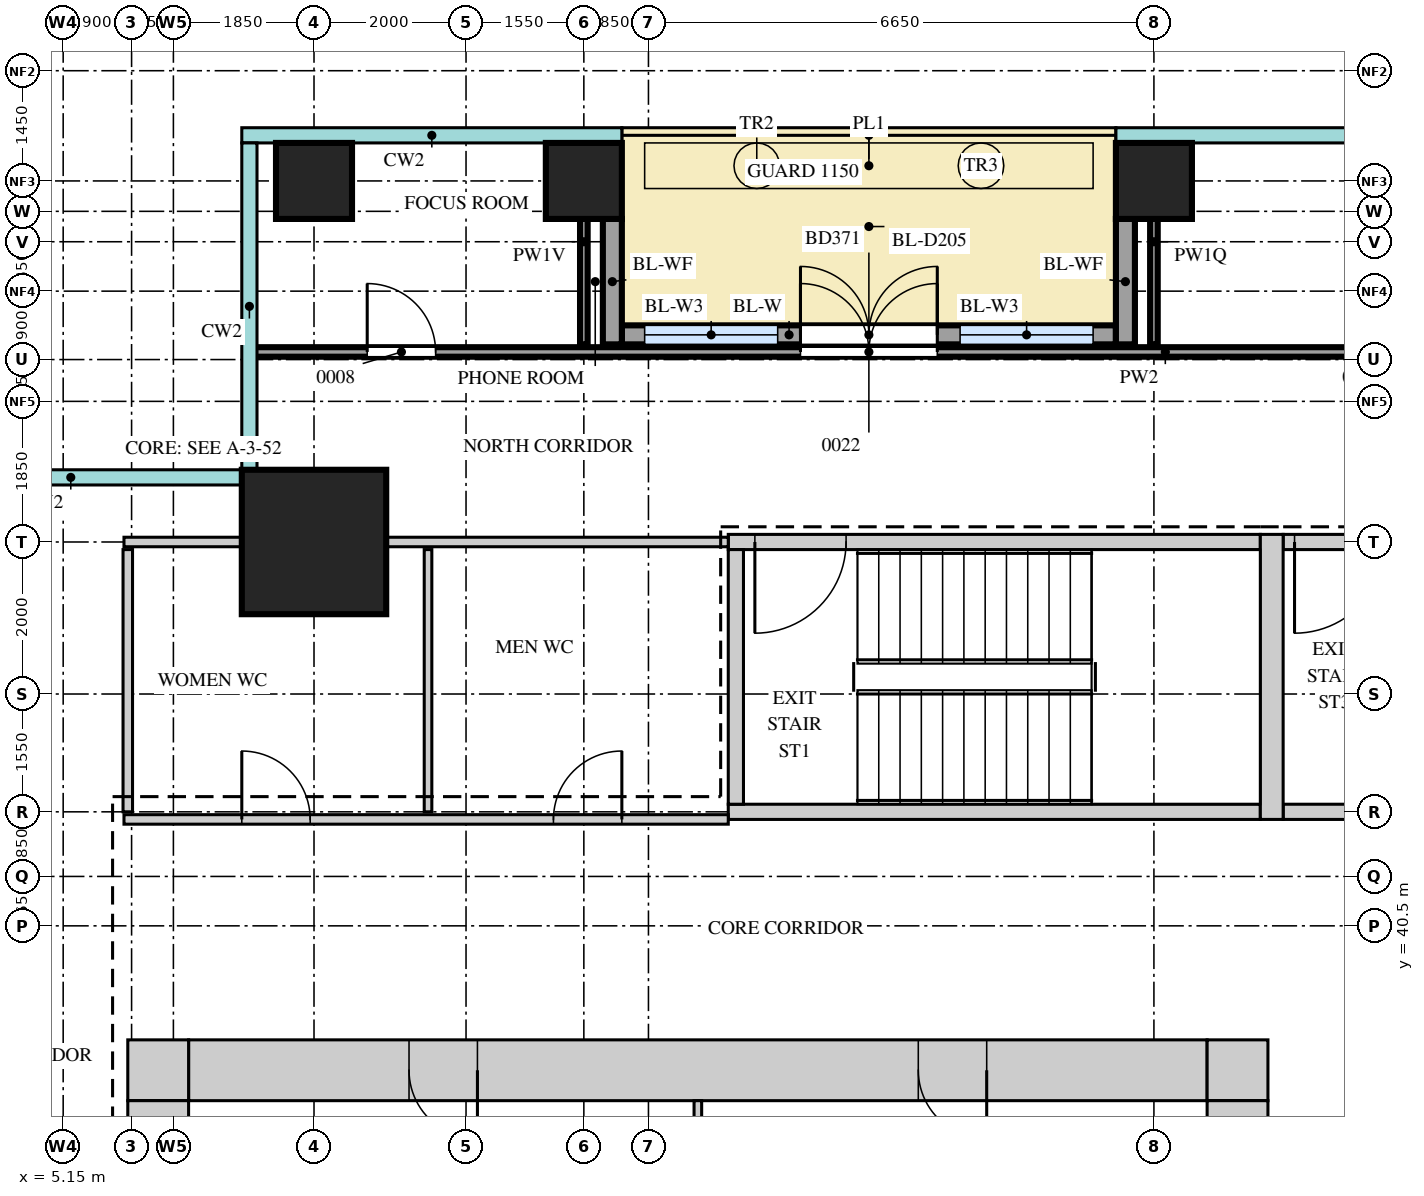
"""IFC4 building model, lengths in metres.
Left out: names, types, materials, properties, quantities, classifications, styles, units other than length and angle.
Written with IfcOpenShell. Run it as: python <this file> out.ifc"""

import sys

from ifc_helpers import new_model, si_unit, direction, frame, frame_2d, origin, origin_2d, place, context, subcontext, project, spatial, rectangle, extrude, source, transform, mapped, element, fill, save


model = new_model("IFC4")
c1 = context("Model", 3, precision=1e-05, world=origin(), true_north=direction((0.0, 1.0)))
c2 = subcontext(c1, "Body", "Model", "MODEL_VIEW")
j1 = project(units=[si_unit("LENGTHUNIT", "METRE"), si_unit("PLANEANGLEUNIT", "RADIAN")], contexts=[c1])
p1 = place(None, origin())
s1 = spatial("IfcSite", under=j1, at=p1, CompositionType="ELEMENT")
p2 = place(p1, origin())
s2 = spatial("IfcBuilding", under=s1, at=p2, CompositionType="ELEMENT")
p3 = place(p2, frame((0.0, 0.0, 172.7)))
s3 = spatial("IfcBuildingStorey", under=s2, at=p3, CompositionType="ELEMENT", Elevation=172.7)
m1 = source(origin(), c2, "Body", "SweptSolid", [
    extrude(rectangle(XDim=13.4, YDim=0.8, at=frame_2d((6.7, 0.0))), origin(), (0.0, 0.0, 1.0), 3.75),
])
p4 = place(p3, frame((6.8, 38.6, 0.0), z_axis=(0.0, 0.0, 1.0), x_axis=(1.0, 0.0, 0.0)))
e1 = element("IfcWall", 1, at=p4, inside=s3, PredefinedType="SHEAR", context=c2, shape_type="MappedRepresentation", body=[
    mapped(m1, transform((0.0, 0.0, 0.0))),
])
m2 = source(origin(), c2, "Body", "SweptSolid", [
    extrude(rectangle(XDim=0.9, YDim=2.1, at=frame_2d((0.45, 1.05))), frame((0.0, 0.41, 0.0), z_axis=(0.0, -1.0, 0.0), x_axis=(1.0, 0.0, 0.0)), (0.0, 0.0, 1.0), 0.82),
])
p5 = place(p4, frame((2.9, 0.0, 0.0)))
e2 = element("IfcOpeningElement", 2, at=p5, cuts=e1, PredefinedType="OPENING", context=c2, shape_type="MappedRepresentation", body=[
    mapped(m2, transform((0.0, 0.0, 0.0))),
])
p6 = place(p4, frame((9.6, 0.0, 0.0)))
e3 = element("IfcOpeningElement", 3, at=p6, cuts=e1, PredefinedType="OPENING", context=c2, shape_type="MappedRepresentation", body=[
    mapped(m2, transform((0.0, 0.0, 0.0))),
])
m3 = source(origin(), c2, "Body", "SweptSolid", [
    extrude(rectangle(XDim=0.8, YDim=0.8, at=frame_2d((0.4, 0.0))), origin(), (0.0, 0.0, 1.0), 3.75),
])
for number, where, z_axis, x_axis in (
    (4, (20.2, 38.6, 0.0), (0.0, 0.0, 1.0), (1.0, 0.0, 0.0)),
    (5, (6.0, 38.6, 0.0), (0.0, 0.0, 1.0), (1.0, 0.0, 0.0)),
):
    element("IfcWall", number, at=place(p3, frame(where, z_axis=z_axis, x_axis=x_axis)), inside=s3, PredefinedType="SHEAR", context=c2, shape_type="MappedRepresentation", body=[
        mapped(m3, transform((0.0, 0.0, 0.0))),
    ])
m4 = source(origin(), c2, "Body", "SweptSolid", [
    extrude(rectangle(XDim=22.4, YDim=0.8, at=frame_2d((11.2, 0.0))), origin(), (0.0, 0.0, 1.0), 3.75),
])
p7 = place(p3, frame((20.6, 15.8, 0.0), z_axis=(0.0, 0.0, 1.0), x_axis=(0.0, 1.0, 0.0)))
e6 = element("IfcWall", 6, at=p7, inside=s3, PredefinedType="SHEAR", context=c2, shape_type="MappedRepresentation", body=[
    mapped(m4, transform((0.0, 0.0, 0.0))),
])
m5 = source(origin(), c2, "Body", "SweptSolid", [
    extrude(rectangle(XDim=1.8, YDim=2.1, at=frame_2d((0.9, 1.05))), frame((0.0, 0.41, 0.0), z_axis=(0.0, -1.0, 0.0), x_axis=(1.0, 0.0, 0.0)), (0.0, 0.0, 1.0), 0.82),
])
p8 = place(p7, frame((10.7, 0.0, 0.0)))
e7 = element("IfcOpeningElement", 7, at=p8, cuts=e6, PredefinedType="OPENING", context=c2, shape_type="MappedRepresentation", body=[
    mapped(m5, transform((0.0, 0.0, 0.0))),
])
p9 = place(p7, frame((0.35, 0.0, 0.0)))
e8 = element("IfcOpeningElement", 8, at=p9, cuts=e6, PredefinedType="OPENING", context=c2, shape_type="MappedRepresentation", body=[
    mapped(m2, transform((0.0, 0.0, 0.0))),
])
p10 = place(p7, frame((2.8, 0.0, 0.0)))
e9 = element("IfcOpeningElement", 9, at=p10, cuts=e6, PredefinedType="OPENING", context=c2, shape_type="MappedRepresentation", body=[
    mapped(m2, transform((0.0, 0.0, 0.0))),
])
p11 = place(p7, frame((5.55, 0.0, 0.0)))
e10 = element("IfcOpeningElement", 10, at=p11, cuts=e6, PredefinedType="OPENING", context=c2, shape_type="MappedRepresentation", body=[
    mapped(m2, transform((0.0, 0.0, 0.0))),
])
p12 = place(p3, frame((6.4, 15.8, 0.0), z_axis=(0.0, 0.0, 1.0), x_axis=(0.0, 1.0, 0.0)))
e11 = element("IfcWall", 11, at=p12, inside=s3, PredefinedType="SHEAR", context=c2, shape_type="MappedRepresentation", body=[
    mapped(m4, transform((0.0, 0.0, 0.0))),
])
m6 = source(origin(), c2, "Body", "SweptSolid", [
    extrude(rectangle(XDim=7.0, YDim=0.2, at=frame_2d((3.5, 0.0))), origin(), (0.0, 0.0, 1.0), 3.75),
])
p13 = place(p3, frame((13.9, 45.55, 0.0), z_axis=(0.0, 0.0, 1.0), x_axis=(1.0, 0.0, 0.0)))
e12 = element("IfcWall", 12, at=p13, inside=s3, PredefinedType="SHEAR", context=c2, shape_type="MappedRepresentation", body=[
    mapped(m6, transform((0.0, 0.0, 0.0))),
])
m7 = source(origin(), c2, "Body", "SweptSolid", [
    extrude(rectangle(XDim=1.2, YDim=2.1, at=frame_2d((0.6, 1.05))), frame((0.0, 0.11, 0.0), z_axis=(0.0, -1.0, 0.0), x_axis=(1.0, 0.0, 0.0)), (0.0, 0.0, 1.0), 0.22),
])
p14 = place(p13, frame((0.35, 0.0, 0.0)))
e13 = element("IfcOpeningElement", 13, at=p14, cuts=e12, PredefinedType="OPENING", context=c2, shape_type="MappedRepresentation", body=[
    mapped(m7, transform((0.0, 0.0, 0.0))),
])
p15 = place(p3, frame((13.9, 42.0, 0.0), z_axis=(0.0, 0.0, 1.0), x_axis=(1.0, 0.0, 0.0)))
e14 = element("IfcWall", 14, at=p15, inside=s3, PredefinedType="SHEAR", context=c2, shape_type="MappedRepresentation", body=[
    mapped(m6, transform((0.0, 0.0, 0.0))),
])
m8 = source(origin(), c2, "Body", "SweptSolid", [
    extrude(rectangle(XDim=7.1, YDim=0.2, at=frame_2d((3.55, 0.0))), origin(), (0.0, 0.0, 1.0), 3.75),
])
p16 = place(p3, frame((21.2, 45.55, 0.0), z_axis=(0.0, 0.0, 1.0), x_axis=(1.0, 0.0, 0.0)))
e15 = element("IfcWall", 15, at=p16, inside=s3, PredefinedType="SHEAR", context=c2, shape_type="MappedRepresentation", body=[
    mapped(m8, transform((0.0, 0.0, 0.0))),
])
p17 = place(p16, frame((0.15, 0.0, 0.0)))
e16 = element("IfcOpeningElement", 16, at=p17, cuts=e15, PredefinedType="OPENING", context=c2, shape_type="MappedRepresentation", body=[
    mapped(m7, transform((0.0, 0.0, 0.0))),
])
p18 = place(p3, frame((21.2, 42.0, 0.0), z_axis=(0.0, 0.0, 1.0), x_axis=(1.0, 0.0, 0.0)))
e17 = element("IfcWall", 17, at=p18, inside=s3, PredefinedType="SHEAR", context=c2, shape_type="MappedRepresentation", body=[
    mapped(m8, transform((0.0, 0.0, 0.0))),
])
m9 = source(origin(), c2, "Body", "SweptSolid", [
    extrude(rectangle(XDim=3.75, YDim=0.3, at=frame_2d((1.875, 0.0))), origin(), (0.0, 0.0, 1.0), 3.75),
])
p19 = place(p3, frame((21.05, 41.9, 0.0), z_axis=(0.0, 0.0, 1.0), x_axis=(0.0, 1.0, 0.0)))
e18 = element("IfcWall", 18, at=p19, inside=s3, PredefinedType="SHEAR", context=c2, shape_type="MappedRepresentation", body=[
    mapped(m9, transform((0.0, 0.0, 0.0))),
])
m10 = source(origin(), c2, "Body", "SweptSolid", [
    extrude(rectangle(XDim=3.35, YDim=0.2, at=frame_2d((1.675, 0.0))), origin(), (0.0, 0.0, 1.0), 3.75),
])
p20 = place(p3, frame((14.0, 42.1, 0.0), z_axis=(0.0, 0.0, 1.0), x_axis=(0.0, 1.0, 0.0)))
e19 = element("IfcWall", 19, at=p20, inside=s3, PredefinedType="SHEAR", context=c2, shape_type="MappedRepresentation", body=[
    mapped(m10, transform((0.0, 0.0, 0.0))),
])
m11 = source(origin(), c2, "Body", "SweptSolid", [
    extrude(rectangle(XDim=1.9, YDim=1.9, at=origin_2d()), origin(), (0.0, 0.0, 1.0), 4.0),
])
p21 = place(p3, frame((8.45, 45.55, 0.0), z_axis=(0.0, 0.0, 1.0), x_axis=(1.0, 0.0, 0.0)))
e20 = element("IfcColumn", 20, at=p21, inside=s3, PredefinedType="COLUMN", context=c2, shape_type="MappedRepresentation", body=[
    mapped(m11, transform((0.0, 0.0, 0.0))),
])
m12 = source(origin(), c2, "Body", "SweptSolid", [
    extrude(rectangle(XDim=1.0, YDim=1.0, at=origin_2d()), origin(), (0.0, 0.0, 1.0), 3.75),
])
for number, where, z_axis, x_axis in (
    (21, (8.45, 50.3, 0.0), (0.0, 0.0, 1.0), (1.0, 0.0, 0.0)),
    (22, (12.0, 50.3, 0.0), (0.0, 0.0, 1.0), (1.0, 0.0, 0.0)),
    (23, (19.5, 50.3, 0.0), (0.0, 0.0, 1.0), (1.0, 0.0, 0.0)),
):
    element("IfcColumn", number, at=place(p3, frame(where, z_axis=z_axis, x_axis=x_axis)), inside=s3, PredefinedType="COLUMN", context=c2, shape_type="MappedRepresentation", body=[
        mapped(m12, transform((0.0, 0.0, 0.0))),
    ])
m13 = source(origin(), c2, "Body", "SweptSolid", [
    extrude(rectangle(XDim=6.5, YDim=0.25, at=frame_2d((3.25, 0.0))), origin(), (0.0, 0.0, 1.0), 3.75),
])
p22 = place(p3, frame((12.5, 48.275, 0.0), z_axis=(0.0, 0.0, 1.0), x_axis=(1.0, 0.0, 0.0)))
e24 = element("IfcWall", 24, at=p22, inside=s3, PredefinedType="SOLIDWALL", context=c2, shape_type="MappedRepresentation", body=[
    mapped(m13, transform((0.0, 0.0, 0.0))),
])
m14 = source(origin(), c2, "Body", "SweptSolid", [
    extrude(rectangle(XDim=1.75, YDim=2.4, at=frame_2d((0.875, 1.2))), frame((0.0, 0.135, 0.0), z_axis=(0.0, -1.0, 0.0), x_axis=(1.0, 0.0, 0.0)), (0.0, 0.0, 1.0), 0.27),
])
p23 = place(p22, frame((0.3, 0.0, 0.0)))
e25 = element("IfcOpeningElement", 25, at=p23, cuts=e24, PredefinedType="OPENING", context=c2, shape_type="MappedRepresentation", body=[
    mapped(m14, transform((0.0, 0.0, 0.0))),
])
p24 = place(p22, frame((4.45, 0.0, 0.0)))
e26 = element("IfcOpeningElement", 26, at=p24, cuts=e24, PredefinedType="OPENING", context=c2, shape_type="MappedRepresentation", body=[
    mapped(m14, transform((0.0, 0.0, 0.0))),
])
m15 = source(origin(), c2, "Body", "SweptSolid", [
    extrude(rectangle(XDim=1.8, YDim=2.4, at=frame_2d((0.9, 1.2))), frame((0.0, 0.135, 0.0), z_axis=(0.0, -1.0, 0.0), x_axis=(1.0, 0.0, 0.0)), (0.0, 0.0, 1.0), 0.27),
])
p25 = place(p22, frame((2.35, 0.0, 0.0)))
e27 = element("IfcOpeningElement", 27, at=p25, cuts=e24, PredefinedType="OPENING", context=c2, shape_type="MappedRepresentation", body=[
    mapped(m15, transform((0.0, 0.0, 0.0))),
])
m16 = source(origin(), c2, "Body", "SweptSolid", [
    extrude(rectangle(XDim=1.65, YDim=0.25, at=frame_2d((0.825, 0.0))), origin(), (0.0, 0.0, 1.0), 3.45),
])
for number, where, z_axis, x_axis in (
    (28, (12.375, 49.8, 0.0), (0.0, 0.0, 1.0), (0.0, -1.0, 0.0)),
    (29, (19.125, 49.8, 0.0), (0.0, 0.0, 1.0), (0.0, -1.0, 0.0)),
):
    element("IfcWall", number, at=place(p3, frame(where, z_axis=z_axis, x_axis=x_axis)), inside=s3, PredefinedType="SOLIDWALL", context=c2, shape_type="MappedRepresentation", body=[
        mapped(m16, transform((0.0, 0.0, 0.0))),
    ])
m17 = source(origin(), c2, "Body", "SweptSolid", [
    extrude(rectangle(XDim=6.0, YDim=0.1, at=frame_2d((3.0, 0.0))), origin(), (0.0, 0.0, 1.0), 3.8),
])
p26 = place(p3, frame((13.5, 32.2, 0.0), z_axis=(0.0, 0.0, 1.0), x_axis=(0.0, 1.0, 0.0)))
e30 = element("IfcWall", 30, at=p26, inside=s3, PredefinedType="PARTITIONING", context=c2, shape_type="MappedRepresentation", body=[
    mapped(m17, transform((0.0, 0.0, 0.0))),
])
m18 = source(origin(), c2, "Body", "SweptSolid", [
    extrude(rectangle(XDim=7.95, YDim=0.125, at=frame_2d((3.975, 0.0))), origin(), (0.0, 0.0, 1.0), 3.8),
])
p27 = place(p3, frame((5.95, 41.9, 0.0), z_axis=(0.0, 0.0, 1.0), x_axis=(1.0, 0.0, 0.0)))
e31 = element("IfcWall", 31, at=p27, inside=s3, PredefinedType="PARTITIONING", context=c2, shape_type="MappedRepresentation", body=[
    mapped(m18, transform((0.0, 0.0, 0.0))),
])
m19 = source(origin(), c2, "Body", "SweptSolid", [
    extrude(rectangle(XDim=0.9, YDim=2.1, at=frame_2d((0.45, 1.05))), frame((0.0, 0.073, 0.0), z_axis=(0.0, -1.0, 0.0), x_axis=(1.0, 0.0, 0.0)), (0.0, 0.0, 1.0), 0.145),
])
p28 = place(p27, frame((1.55, 0.0, 0.0)))
e32 = element("IfcOpeningElement", 32, at=p28, cuts=e31, PredefinedType="OPENING", context=c2, shape_type="MappedRepresentation", body=[
    mapped(m19, transform((0.0, 0.0, 0.0))),
])
p29 = place(p27, frame((5.65, 0.0, 0.0)))
e33 = element("IfcOpeningElement", 33, at=p29, cuts=e31, PredefinedType="OPENING", context=c2, shape_type="MappedRepresentation", body=[
    mapped(m19, transform((0.0, 0.0, 0.0))),
])
m20 = source(origin(), c2, "Body", "SweptSolid", [
    extrude(rectangle(XDim=3.45, YDim=0.125, at=frame_2d((1.725, 0.0))), origin(), (0.0, 0.0, 1.0), 3.8),
])
p30 = place(p3, frame((6.0, 42.0, 0.0), z_axis=(0.0, 0.0, 1.0), x_axis=(0.0, 1.0, 0.0)))
e34 = element("IfcWall", 34, at=p30, inside=s3, PredefinedType="PARTITIONING", context=c2, shape_type="MappedRepresentation", body=[
    mapped(m20, transform((0.0, 0.0, 0.0))),
])
m21 = source(origin(), c2, "Body", "SweptSolid", [
    extrude(rectangle(XDim=3.45, YDim=0.1, at=frame_2d((1.725, 0.0))), origin(), (0.0, 0.0, 1.0), 3.8),
])
p31 = place(p3, frame((9.95, 42.0, 0.0), z_axis=(0.0, 0.0, 1.0), x_axis=(0.0, 1.0, 0.0)))
e35 = element("IfcWall", 35, at=p31, inside=s3, PredefinedType="PARTITIONING", context=c2, shape_type="MappedRepresentation", body=[
    mapped(m21, transform((0.0, 0.0, 0.0))),
])
m22 = source(origin(), c2, "Body", "SweptSolid", [
    extrude(rectangle(XDim=7.95, YDim=0.125, at=frame_2d((3.975, 0.0))), origin(), (0.0, 0.0, 1.0), 3.25),
])
p32 = place(p3, frame((5.95, 45.55, 0.0), z_axis=(0.0, 0.0, 1.0), x_axis=(1.0, 0.0, 0.0)))
e36 = element("IfcWall", 36, at=p32, inside=s3, PredefinedType="PARTITIONING", context=c2, shape_type="MappedRepresentation", body=[
    mapped(m22, transform((0.0, 0.0, 0.0))),
])
m23 = source(origin(), c2, "Body", "SweptSolid", [
    extrude(rectangle(XDim=24.35, YDim=0.125, at=frame_2d((12.175, 0.0))), origin(), (0.0, 0.0, 1.0), 3.8),
])
p33 = place(p3, frame((7.65, 48.05, 0.0), z_axis=(0.0, 0.0, 1.0), x_axis=(1.0, 0.0, 0.0)))
e37 = element("IfcWall", 37, at=p33, inside=s3, PredefinedType="PARTITIONING", context=c2, shape_type="MappedRepresentation", body=[
    mapped(m23, transform((0.0, 0.0, 0.0))),
])
p34 = place(p33, frame((1.5, 0.0, 0.0)))
e38 = element("IfcOpeningElement", 38, at=p34, cuts=e37, PredefinedType="OPENING", context=c2, shape_type="MappedRepresentation", body=[
    mapped(m19, transform((0.0, 0.0, 0.0))),
])
m24 = source(origin(), c2, "Body", "SweptSolid", [
    extrude(rectangle(XDim=1.8, YDim=2.1, at=frame_2d((0.9, 1.05))), frame((0.0, 0.073, 0.0), z_axis=(0.0, -1.0, 0.0), x_axis=(1.0, 0.0, 0.0)), (0.0, 0.0, 1.0), 0.145),
])
p35 = place(p33, frame((7.2, 0.0, 0.0)))
e39 = element("IfcOpeningElement", 39, at=p35, cuts=e37, PredefinedType="OPENING", context=c2, shape_type="MappedRepresentation", body=[
    mapped(m24, transform((0.0, 0.0, 0.0))),
])
p36 = place(p33, frame((15.0, 0.0, 0.0)))
e40 = element("IfcOpeningElement", 40, at=p36, cuts=e37, PredefinedType="OPENING", context=c2, shape_type="MappedRepresentation", body=[
    mapped(m19, transform((0.0, 0.0, 0.0))),
])
p37 = place(p33, frame((21.35, 0.0, 0.0)))
e41 = element("IfcOpeningElement", 41, at=p37, cuts=e37, PredefinedType="OPENING", context=c2, shape_type="MappedRepresentation", body=[
    mapped(m19, transform((0.0, 0.0, 0.0))),
])
m25 = source(origin(), c2, "Body", "SweptSolid", [
    extrude(rectangle(XDim=2.7, YDim=0.1, at=frame_2d((1.35, 0.0))), origin(), (0.0, 0.0, 1.0), 3.25),
])
p38 = place(p3, frame((12.0, 48.15, 0.0), z_axis=(0.0, 0.0, 1.0), x_axis=(0.0, 1.0, 0.0)))
e42 = element("IfcWall", 42, at=p38, inside=s3, PredefinedType="PARTITIONING", context=c2, shape_type="MappedRepresentation", body=[
    mapped(m25, transform((0.0, 0.0, 0.0))),
])
m26 = source(origin(), c2, "Body", "SweptSolid", [
    extrude(rectangle(XDim=2.7, YDim=0.1, at=frame_2d((1.35, 0.0))), origin(), (0.0, 0.0, 1.0), 3.42),
])
p39 = place(p3, frame((19.5, 48.15, 0.0), z_axis=(0.0, 0.0, 1.0), x_axis=(0.0, 1.0, 0.0)))
e43 = element("IfcWall", 43, at=p39, inside=s3, PredefinedType="PARTITIONING", context=c2, shape_type="MappedRepresentation", body=[
    mapped(m26, transform((0.0, 0.0, 0.0))),
])
m27 = source(origin(), c2, "Body", "SweptSolid", [
    extrude(rectangle(XDim=1.75, YDim=2.4, at=frame_2d((0.875, 1.2))), frame((0.0, 0.03, 0.0), z_axis=(0.0, -1.0, 0.0), x_axis=(1.0, 0.0, 0.0)), (0.0, 0.0, 1.0), 0.06),
])
p40 = place(p23, origin())
e44 = element("IfcWindow", 44, at=p40, inside=s3, PartitioningType="SINGLE_PANEL", PredefinedType="WINDOW", context=c2, shape_type="MappedRepresentation", body=[
    mapped(m27, transform((0.0, 0.0, 0.0))),
])
fill(e25, e44)
p41 = place(p24, origin())
e45 = element("IfcWindow", 45, at=p41, inside=s3, PartitioningType="SINGLE_PANEL", PredefinedType="WINDOW", context=c2, shape_type="MappedRepresentation", body=[
    mapped(m27, transform((0.0, 0.0, 0.0))),
])
fill(e26, e45)
m28 = source(origin(), c2, "Body", "SweptSolid", [
    extrude(rectangle(XDim=1.8, YDim=2.4, at=frame_2d((0.9, 1.2))), frame((0.0, 0.025, 0.0), z_axis=(0.0, -1.0, 0.0), x_axis=(1.0, 0.0, 0.0)), (0.0, 0.0, 1.0), 0.05),
])
p42 = place(p25, origin())
e46 = element("IfcDoor", 46, at=p42, inside=s3, OperationType="DOUBLE_DOOR_DOUBLE_SWING", PredefinedType="DOOR", context=c2, shape_type="MappedRepresentation", body=[
    mapped(m28, transform((0.0, 0.0, 0.0))),
])
fill(e27, e46)
m29 = source(origin(), c2, "Body", "SweptSolid", [
    extrude(rectangle(XDim=0.9, YDim=2.1, at=frame_2d((0.45, 1.05))), frame((0.0, 0.35, 0.0), z_axis=(0.0, -1.0, 0.0), x_axis=(1.0, 0.0, 0.0)), (0.0, 0.0, 1.0), 0.7),
])
p43 = place(p5, origin())
e47 = element("IfcDoor", 47, at=p43, inside=s3, OperationType="SINGLE_SWING_RIGHT", PredefinedType="DOOR", context=c2, shape_type="MappedRepresentation", body=[
    mapped(m29, transform((0.0, 0.0, 0.0))),
])
fill(e2, e47)
p44 = place(p6, origin())
e48 = element("IfcDoor", 48, at=p44, inside=s3, OperationType="SINGLE_SWING_RIGHT", PredefinedType="DOOR", context=c2, shape_type="MappedRepresentation", body=[
    mapped(m29, transform((0.0, 0.0, 0.0))),
])
fill(e3, e48)
m30 = source(origin(), c2, "Body", "SweptSolid", [
    extrude(rectangle(XDim=0.9, YDim=2.1, at=frame_2d((0.45, 1.05))), frame((0.0, 0.025, 0.0), z_axis=(0.0, -1.0, 0.0), x_axis=(1.0, 0.0, 0.0)), (0.0, 0.0, 1.0), 0.05),
])
p45 = place(p28, origin())
e49 = element("IfcDoor", 49, at=p45, inside=s3, OperationType="SINGLE_SWING_RIGHT", PredefinedType="DOOR", context=c2, shape_type="MappedRepresentation", body=[
    mapped(m30, transform((0.0, 0.0, 0.0))),
])
fill(e32, e49)
p46 = place(p29, origin())
e50 = element("IfcDoor", 50, at=p46, inside=s3, OperationType="SINGLE_SWING_LEFT", PredefinedType="DOOR", context=c2, shape_type="MappedRepresentation", body=[
    mapped(m30, transform((0.0, 0.0, 0.0))),
])
fill(e33, e50)
p47 = place(p34, origin())
e51 = element("IfcDoor", 51, at=p47, inside=s3, OperationType="SINGLE_SWING_RIGHT", PredefinedType="DOOR", context=c2, shape_type="MappedRepresentation", body=[
    mapped(m30, transform((0.0, 0.0, 0.0))),
])
fill(e38, e51)
m31 = source(origin(), c2, "Body", "SweptSolid", [
    extrude(rectangle(XDim=1.8, YDim=2.1, at=frame_2d((0.9, 1.05))), frame((0.0, 0.025, 0.0), z_axis=(0.0, -1.0, 0.0), x_axis=(1.0, 0.0, 0.0)), (0.0, 0.0, 1.0), 0.05),
])
p48 = place(p35, origin())
e52 = element("IfcDoor", 52, at=p48, inside=s3, OperationType="DOUBLE_DOOR_SINGLE_SWING", PredefinedType="DOOR", context=c2, shape_type="MappedRepresentation", body=[
    mapped(m31, transform((0.0, 0.0, 0.0))),
])
fill(e39, e52)
m32 = source(origin(), c2, "Body", "SweptSolid", [
    extrude(rectangle(XDim=1.2, YDim=2.1, at=frame_2d((0.6, 1.05))), frame((0.0, 0.025, 0.0), z_axis=(0.0, -1.0, 0.0), x_axis=(1.0, 0.0, 0.0)), (0.0, 0.0, 1.0), 0.05),
])
p49 = place(p14, origin())
e53 = element("IfcDoor", 53, at=p49, inside=s3, OperationType="SINGLE_SWING_LEFT", PredefinedType="DOOR", context=c2, shape_type="MappedRepresentation", body=[
    mapped(m32, transform((0.0, 0.0, 0.0))),
])
fill(e13, e53)
p50 = place(p17, origin())
e54 = element("IfcDoor", 54, at=p50, inside=s3, OperationType="SINGLE_SWING_LEFT", PredefinedType="DOOR", context=c2, shape_type="MappedRepresentation", body=[
    mapped(m32, transform((0.0, 0.0, 0.0))),
])
fill(e16, e54)
save(model, sys.argv[1])
